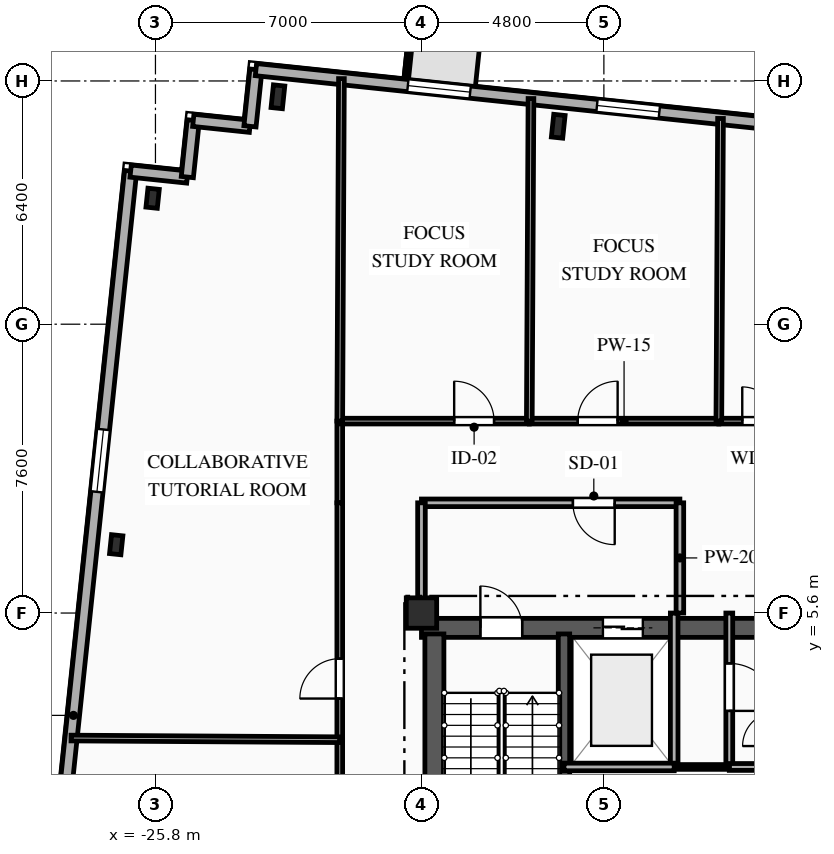
"""IFC4 building model, lengths in metres.
Left out: names, types, materials, properties, quantities, classifications, styles, units other than length and angle.
Written with IfcOpenShell. Run it as: python <this file> out.ifc"""

import sys

from ifc_helpers import new_model, si_unit, direction, frame, frame_2d, origin, origin_2d, place, context, subcontext, project, spatial, rectangle, i_section, extrude, element, fill, save


model = new_model("IFC4")
c1 = context("Model", 3, precision=1e-05, world=origin(), true_north=direction((0.0, 1.0)))
c2 = subcontext(c1, "Body", "Model", "MODEL_VIEW")
j1 = project(units=[si_unit("LENGTHUNIT", "METRE"), si_unit("PLANEANGLEUNIT", "RADIAN")], contexts=[c1])
p1 = place(None, origin())
s1 = spatial("IfcSite", under=j1, at=p1, CompositionType="ELEMENT")
p2 = place(p1, origin())
s2 = spatial("IfcBuilding", under=s1, at=p2, CompositionType="ELEMENT")
p3 = place(p2, frame((0.0, 0.0, 193.05)))
s3 = spatial("IfcBuildingStorey", under=s2, at=p3, CompositionType="ELEMENT", Elevation=193.05)
p4 = place(p3, frame((-18.8, 5.6, 0.0), z_axis=(0.0, 0.0, 1.0), x_axis=(1.0, 0.0, 0.0)))
e1 = element("IfcColumn", 1, at=p4, inside=s3, PredefinedType="COLUMN", context=c2, shape_type="SweptSolid", body=[
    extrude(rectangle(XDim=0.8, YDim=0.8, at=origin_2d()), origin(), (0.0, 0.0, 1.0), 3.35),
])
for number, where, z_axis, x_axis in (
    (2, (-15.201, 18.409, 0.0), (0.0, 0.0, 1.0), (0.995, -0.105, 0.0)),
    (3, (-22.577, 19.184, 0.0), (0.0, 0.0, 1.0), (0.995, -0.105, 0.0)),
):
    element("IfcColumn", number, at=place(p3, frame(where, z_axis=z_axis, x_axis=x_axis)), inside=s3, PredefinedType="COLUMN", context=c2, shape_type="SweptSolid", body=[
        extrude(i_section(OverallWidth=0.3, OverallDepth=0.6, WebThickness=0.015, FlangeThickness=0.03, FilletRadius=0.027, at=origin_2d()), origin(), (0.0, 0.0, 1.0), 3.35),
    ])
for number, where, z_axis, x_axis in (
    (4, (-25.875, 16.514, 0.0), (0.0, 0.0, 1.0), (0.995, -0.105, 0.0)),
    (5, (-26.833, 7.398, 0.0), (0.0, 0.0, 1.0), (0.995, -0.105, 0.0)),
):
    element("IfcColumn", number, at=place(p3, frame(where, z_axis=z_axis, x_axis=x_axis)), inside=s3, PredefinedType="COLUMN", context=c2, shape_type="SweptSolid", body=[
        extrude(i_section(OverallWidth=0.3, OverallDepth=0.5, WebThickness=0.014, FlangeThickness=0.028, FilletRadius=0.027, at=origin_2d()), origin(), (0.0, 0.0, 1.0), 3.35),
    ])
p5 = place(p3, frame((-29.463, -11.414, 0.0), z_axis=(0.0, 0.0, 1.0), x_axis=(0.104530779244, 0.994521651947, 0.0)))
e6 = element("IfcWall", 6, at=p5, inside=s3, PredefinedType="SOLIDWALL", context=c2, shape_type="SweptSolid", body=[
    extrude(rectangle(XDim=28.8, YDim=0.32, at=frame_2d((14.4, 0.0))), origin(), (0.0, 0.0, 1.0), 3.04),
])
p6 = place(p5, frame((6.355, 0.0, 0.85)))
e7 = element("IfcOpeningElement", 7, at=p6, cuts=e6, PredefinedType="OPENING", context=c2, shape_type="SweptSolid", body=[
    extrude(rectangle(XDim=1.65, YDim=1.85, at=frame_2d((0.825, 0.925))), frame((0.0, 0.17, 0.0), z_axis=(0.0, -1.0, 0.0), x_axis=(1.0, 0.0, 0.0)), (0.0, 0.0, 1.0), 0.34),
])
p7 = place(p5, frame((20.314, 0.0, 0.85)))
e8 = element("IfcOpeningElement", 8, at=p7, cuts=e6, PredefinedType="OPENING", context=c2, shape_type="SweptSolid", body=[
    extrude(rectangle(XDim=1.65, YDim=1.85, at=frame_2d((0.825, 0.925))), frame((0.0, 0.17, 0.0), z_axis=(0.0, -1.0, 0.0), x_axis=(1.0, 0.0, 0.0)), (0.0, 0.0, 1.0), 0.34),
])
p8 = place(p3, frame((-26.453, 17.229, 0.0), z_axis=(0.0, 0.0, 1.0), x_axis=(0.994508128223, -0.104659366031, 0.0)))
e9 = element("IfcWall", 9, at=p8, inside=s3, PredefinedType="SOLIDWALL", context=c2, shape_type="SweptSolid", body=[
    extrude(rectangle(XDim=1.5, YDim=0.32, at=frame_2d((0.75, 0.0))), origin(), (0.0, 0.0, 1.0), 3.04),
])
p9 = place(p3, frame((-24.961, 17.072, 0.0), z_axis=(0.0, 0.0, 1.0), x_axis=(0.104642427191, 0.994509910675, 0.0)))
e10 = element("IfcWall", 10, at=p9, inside=s3, PredefinedType="SOLIDWALL", context=c2, shape_type="SweptSolid", body=[
    extrude(rectangle(XDim=1.5, YDim=0.32, at=frame_2d((0.75, 0.0))), origin(), (0.0, 0.0, 1.0), 3.04),
])
p10 = place(p3, frame((-24.804, 18.563, 0.0), z_axis=(0.0, 0.0, 1.0), x_axis=(0.994508128223, -0.104659366031, 0.0)))
e11 = element("IfcWall", 11, at=p10, inside=s3, PredefinedType="SOLIDWALL", context=c2, shape_type="SweptSolid", body=[
    extrude(rectangle(XDim=1.5, YDim=0.32, at=frame_2d((0.75, 0.0))), origin(), (0.0, 0.0, 1.0), 3.04),
])
p11 = place(p3, frame((-23.312, 18.406, 0.0), z_axis=(0.0, 0.0, 1.0), x_axis=(0.104481464157, 0.994526834051, 0.0)))
e12 = element("IfcWall", 12, at=p11, inside=s3, PredefinedType="SOLIDWALL", context=c2, shape_type="SweptSolid", body=[
    extrude(rectangle(XDim=1.5, YDim=0.32, at=frame_2d((0.75, 0.0))), origin(), (0.0, 0.0, 1.0), 3.04),
])
p12 = place(p3, frame((-23.156, 19.898, 0.0), z_axis=(0.0, 0.0, 1.0), x_axis=(0.994522001802, -0.104527450613, 0.0)))
e13 = element("IfcWall", 13, at=p12, inside=s3, PredefinedType="SOLIDWALL", context=c2, shape_type="SweptSolid", body=[
    extrude(rectangle(XDim=45.8, YDim=0.32, at=frame_2d((22.9, 0.0))), origin(), (0.0, 0.0, 1.0), 3.04),
])
p13 = place(p12, frame((4.019, 0.0, 0.85)))
e14 = element("IfcOpeningElement", 14, at=p13, cuts=e13, PredefinedType="OPENING", context=c2, shape_type="SweptSolid", body=[
    extrude(rectangle(XDim=1.65, YDim=1.85, at=frame_2d((0.825, 0.925))), frame((0.0, 0.17, 0.0), z_axis=(0.0, -1.0, 0.0), x_axis=(1.0, 0.0, 0.0)), (0.0, 0.0, 1.0), 0.34),
])
p14 = place(p12, frame((9.024, 0.0, 0.85)))
e15 = element("IfcOpeningElement", 15, at=p14, cuts=e13, PredefinedType="OPENING", context=c2, shape_type="SweptSolid", body=[
    extrude(rectangle(XDim=1.65, YDim=1.85, at=frame_2d((0.825, 0.925))), frame((0.0, 0.17, 0.0), z_axis=(0.0, -1.0, 0.0), x_axis=(1.0, 0.0, 0.0)), (0.0, 0.0, 1.0), 0.34),
])
p15 = place(p12, frame((18.066, 0.0, 0.85)))
e16 = element("IfcOpeningElement", 16, at=p15, cuts=e13, PredefinedType="OPENING", context=c2, shape_type="SweptSolid", body=[
    extrude(rectangle(XDim=1.5, YDim=1.85, at=frame_2d((0.75, 0.925))), frame((0.0, 0.17, 0.0), z_axis=(0.0, -1.0, 0.0), x_axis=(1.0, 0.0, 0.0)), (0.0, 0.0, 1.0), 0.34),
])
p16 = place(p12, frame((27.045, 0.0, 0.85)))
e17 = element("IfcOpeningElement", 17, at=p16, cuts=e13, PredefinedType="OPENING", context=c2, shape_type="SweptSolid", body=[
    extrude(rectangle(XDim=2.2, YDim=1.85, at=frame_2d((1.1, 0.925))), frame((0.0, 0.17, 0.0), z_axis=(0.0, -1.0, 0.0), x_axis=(1.0, 0.0, 0.0)), (0.0, 0.0, 1.0), 0.34),
])
p17 = place(p12, frame((38.089, 0.0, 0.85)))
e18 = element("IfcOpeningElement", 18, at=p17, cuts=e13, PredefinedType="OPENING", context=c2, shape_type="SweptSolid", body=[
    extrude(rectangle(XDim=1.65, YDim=1.85, at=frame_2d((0.825, 0.925))), frame((0.0, 0.17, 0.0), z_axis=(0.0, -1.0, 0.0), x_axis=(1.0, 0.0, 0.0)), (0.0, 0.0, 1.0), 0.34),
])
p18 = place(p3, frame((-18.8, 5.21, 0.0), z_axis=(0.0, 0.0, 1.0), x_axis=(1.0, 0.0, 0.0)))
e19 = element("IfcWall", 19, at=p18, inside=s3, PredefinedType="SHEAR", context=c2, shape_type="SweptSolid", body=[
    extrude(rectangle(XDim=9.6, YDim=0.5, at=frame_2d((4.8, 0.0))), origin(), (0.0, 0.0, 1.0), 3.04),
])
p19 = place(p18, frame((1.55, 0.0, 0.0)))
e20 = element("IfcOpeningElement", 20, at=p19, cuts=e19, PredefinedType="OPENING", context=c2, shape_type="SweptSolid", body=[
    extrude(rectangle(XDim=1.1, YDim=2.15, at=frame_2d((0.55, 1.075))), frame((0.0, 0.26, 0.0), z_axis=(0.0, -1.0, 0.0), x_axis=(1.0, 0.0, 0.0)), (0.0, 0.0, 1.0), 0.52),
])
p20 = place(p18, frame((4.775, 0.0, 0.0)))
e21 = element("IfcOpeningElement", 21, at=p20, cuts=e19, PredefinedType="OPENING", context=c2, shape_type="SweptSolid", body=[
    extrude(rectangle(XDim=1.05, YDim=2.1, at=frame_2d((0.525, 1.05))), frame((0.0, 0.26, 0.0), z_axis=(0.0, -1.0, 0.0), x_axis=(1.0, 0.0, 0.0)), (0.0, 0.0, 1.0), 0.52),
])
p21 = place(p3, frame((-18.46, -5.05, 0.0), z_axis=(0.0, 0.0, 1.0), x_axis=(0.0, 1.0, 0.0)))
e22 = element("IfcWall", 22, at=p21, inside=s3, PredefinedType="SHEAR", context=c2, shape_type="SweptSolid", body=[
    extrude(rectangle(XDim=10.1, YDim=0.5, at=frame_2d((5.05, 0.0))), origin(), (0.0, 0.0, 1.0), 3.04),
])
p22 = place(p3, frame((-15.05, -5.05, 0.0), z_axis=(0.0, 0.0, 1.0), x_axis=(0.0, 1.0, 0.0)))
e23 = element("IfcWall", 23, at=p22, inside=s3, PredefinedType="SHEAR", context=c2, shape_type="SweptSolid", body=[
    extrude(rectangle(XDim=10.1, YDim=0.3, at=frame_2d((5.05, 0.0))), origin(), (0.0, 0.0, 1.0), 3.04),
])
p23 = place(p3, frame((-12.15, 1.55, 0.0), z_axis=(0.0, 0.0, 1.0), x_axis=(0.0, 1.0, 0.0)))
e24 = element("IfcWall", 24, at=p23, inside=s3, PredefinedType="PARTITIONING", context=c2, shape_type="SweptSolid", body=[
    extrude(rectangle(XDim=4.05, YDim=0.2, at=frame_2d((2.025, 0.0))), origin(), (0.0, 0.0, 1.0), 3.04),
])
p24 = place(p3, frame((-12.0, 8.5, 0.0), z_axis=(0.0, 0.0, 1.0), x_axis=(-1.0, 0.0, 0.0)))
e25 = element("IfcWall", 25, at=p24, inside=s3, PredefinedType="PARTITIONING", context=c2, shape_type="SweptSolid", body=[
    extrude(rectangle(XDim=6.8, YDim=0.2, at=frame_2d((3.4, 0.0))), origin(), (0.0, 0.0, 1.0), 3.04),
])
p25 = place(p24, frame((1.715, 0.0, 0.0)))
e26 = element("IfcOpeningElement", 26, at=p25, cuts=e25, PredefinedType="OPENING", context=c2, shape_type="SweptSolid", body=[
    extrude(rectangle(XDim=1.1, YDim=2.15, at=frame_2d((0.55, 1.075))), frame((0.0, 0.11, 0.0), z_axis=(0.0, -1.0, 0.0), x_axis=(1.0, 0.0, 0.0)), (0.0, 0.0, 1.0), 0.22),
])
p26 = place(p3, frame((-18.8, 8.5, 0.0), z_axis=(0.0, 0.0, 1.0), x_axis=(0.0, -1.0, 0.0)))
e27 = element("IfcWall", 27, at=p26, inside=s3, PredefinedType="PARTITIONING", context=c2, shape_type="SweptSolid", body=[
    extrude(rectangle(XDim=2.9, YDim=0.2, at=frame_2d((1.45, 0.0))), origin(), (0.0, 0.0, 1.0), 2.665),
])
p27 = place(p3, frame((-12.0, 5.6, 0.0), z_axis=(0.0, 0.0, 1.0), x_axis=(0.0, 1.0, 0.0)))
e28 = element("IfcWall", 28, at=p27, inside=s3, PredefinedType="PARTITIONING", context=c2, shape_type="SweptSolid", body=[
    extrude(rectangle(XDim=2.9, YDim=0.2, at=frame_2d((1.45, 0.0))), origin(), (0.0, 0.0, 1.0), 3.04),
])
p28 = place(p3, frame((-10.7, 5.6, 0.0), z_axis=(0.0, 0.0, 1.0), x_axis=(0.0, -1.0, 0.0)))
e29 = element("IfcWall", 29, at=p28, inside=s3, PredefinedType="PARTITIONING", context=c2, shape_type="SweptSolid", body=[
    extrude(rectangle(XDim=4.05, YDim=0.18, at=frame_2d((2.025, 0.0))), origin(), (0.0, 0.0, 1.0), 3.04),
])
p29 = place(p28, frame((1.325, 0.0, 0.0)))
e30 = element("IfcOpeningElement", 30, at=p29, cuts=e29, PredefinedType="OPENING", context=c2, shape_type="SweptSolid", body=[
    extrude(rectangle(XDim=1.25, YDim=2.2, at=frame_2d((0.625, 1.1))), frame((0.0, 0.1, 0.0), z_axis=(0.0, -1.0, 0.0), x_axis=(1.0, 0.0, 0.0)), (0.0, 0.0, 1.0), 0.2),
])
p30 = place(p3, frame((-10.7, 1.55, 0.0), z_axis=(0.0, 0.0, 1.0), x_axis=(1.0, 0.0, 0.0)))
e31 = element("IfcWall", 31, at=p30, inside=s3, PredefinedType="PARTITIONING", context=c2, shape_type="SweptSolid", body=[
    extrude(rectangle(XDim=1.5, YDim=0.18, at=frame_2d((0.75, 0.0))), origin(), (0.0, 0.0, 1.0), 3.04),
])
p31 = place(p3, frame((-12.15, 1.55, 0.0), z_axis=(0.0, 0.0, 1.0), x_axis=(1.0, 0.0, 0.0)))
e32 = element("IfcWall", 32, at=p31, inside=s3, PredefinedType="PARTITIONING", context=c2, shape_type="SweptSolid", body=[
    extrude(rectangle(XDim=1.45, YDim=0.125, at=frame_2d((0.725, 0.0))), origin(), (0.0, 0.0, 1.0), 3.04),
])
p32 = place(p3, frame((-20.95, 8.5, 0.0), z_axis=(0.0, 0.0, 1.0), x_axis=(0.0, 1.0, 0.0)))
e33 = element("IfcWall", 33, at=p32, inside=s3, PredefinedType="PARTITIONING", context=c2, shape_type="SweptSolid", body=[
    extrude(rectangle(XDim=2.15, YDim=0.15, at=frame_2d((1.075, 0.0))), origin(), (0.0, 0.0, 1.0), 3.04),
])
p33 = place(p3, frame((-20.95, 10.65, 0.0), z_axis=(0.0, 0.0, 1.0), x_axis=(1.0, 0.0, 0.0)))
e34 = element("IfcWall", 34, at=p33, inside=s3, PredefinedType="PARTITIONING", context=c2, shape_type="SweptSolid", body=[
    extrude(rectangle(XDim=4.988, YDim=0.15, at=frame_2d((2.494, 0.0))), origin(), (0.0, 0.0, 1.0), 3.04),
])
p34 = place(p33, frame((3.01, 0.0, 0.0)))
e35 = element("IfcOpeningElement", 35, at=p34, cuts=e34, PredefinedType="OPENING", context=c2, shape_type="SweptSolid", body=[
    extrude(rectangle(XDim=1.05, YDim=2.15, at=frame_2d((0.525, 1.075))), frame((0.0, 0.085, 0.0), z_axis=(0.0, -1.0, 0.0), x_axis=(1.0, 0.0, 0.0)), (0.0, 0.0, 1.0), 0.17),
])
p35 = place(p3, frame((-15.962, 10.65, 0.0), z_axis=(0.0, 0.0, 1.0), x_axis=(1.0, 0.0, 0.0)))
e36 = element("IfcWall", 36, at=p35, inside=s3, PredefinedType="PARTITIONING", context=c2, shape_type="SweptSolid", body=[
    extrude(rectangle(XDim=4.987, YDim=0.15, at=frame_2d((2.494, 0.0))), origin(), (0.0, 0.0, 1.0), 3.04),
])
p36 = place(p35, frame((1.274, 0.0, 0.0)))
e37 = element("IfcOpeningElement", 37, at=p36, cuts=e36, PredefinedType="OPENING", context=c2, shape_type="SweptSolid", body=[
    extrude(rectangle(XDim=1.05, YDim=2.15, at=frame_2d((0.525, 1.075))), frame((0.0, 0.085, 0.0), z_axis=(0.0, -1.0, 0.0), x_axis=(1.0, 0.0, 0.0)), (0.0, 0.0, 1.0), 0.17),
])
p37 = place(p3, frame((-10.975, 10.65, 0.0), z_axis=(0.0, 0.0, 1.0), x_axis=(1.0, 0.0, 0.0)))
e38 = element("IfcWall", 38, at=p37, inside=s3, PredefinedType="PLUMBINGWALL", context=c2, shape_type="SweptSolid", body=[
    extrude(rectangle(XDim=2.35, YDim=0.15, at=frame_2d((1.175, 0.0))), origin(), (0.0, 0.0, 1.0), 3.04),
])
p38 = place(p37, frame((0.616, 0.0, 0.0)))
e39 = element("IfcOpeningElement", 39, at=p38, cuts=e38, PredefinedType="OPENING", context=c2, shape_type="SweptSolid", body=[
    extrude(rectangle(XDim=0.9, YDim=2.1, at=frame_2d((0.45, 1.05))), frame((0.0, 0.085, 0.0), z_axis=(0.0, -1.0, 0.0), x_axis=(1.0, 0.0, 0.0)), (0.0, 0.0, 1.0), 0.17),
])
p39 = place(p3, frame((-20.95, -5.6, 0.0), z_axis=(0.0, 0.0, 1.0), x_axis=(0.0, 1.0, 0.0)))
e40 = element("IfcWall", 40, at=p39, inside=s3, PredefinedType="PARTITIONING", context=c2, shape_type="SweptSolid", body=[
    extrude(rectangle(XDim=7.867, YDim=0.15, at=frame_2d((3.934, 0.0))), origin(), (0.0, 0.0, 1.0), 3.04),
])
p40 = place(p39, frame((4.823, 0.0, 0.0)))
e41 = element("IfcOpeningElement", 41, at=p40, cuts=e40, PredefinedType="OPENING", context=c2, shape_type="SweptSolid", body=[
    extrude(rectangle(XDim=1.05, YDim=2.15, at=frame_2d((0.525, 1.075))), frame((0.0, 0.085, 0.0), z_axis=(0.0, -1.0, 0.0), x_axis=(1.0, 0.0, 0.0)), (0.0, 0.0, 1.0), 0.17),
])
p41 = place(p3, frame((-20.95, 2.267, 0.0), z_axis=(0.0, 0.0, 1.0), x_axis=(0.0, 1.0, 0.0)))
e42 = element("IfcWall", 42, at=p41, inside=s3, PredefinedType="PARTITIONING", context=c2, shape_type="SweptSolid", body=[
    extrude(rectangle(XDim=6.233, YDim=0.15, at=frame_2d((3.116, 0.0))), origin(), (0.0, 0.0, 1.0), 3.04),
])
p42 = place(p41, frame((1.083, 0.0, 0.0)))
e43 = element("IfcOpeningElement", 43, at=p42, cuts=e42, PredefinedType="OPENING", context=c2, shape_type="SweptSolid", body=[
    extrude(rectangle(XDim=1.05, YDim=2.15, at=frame_2d((0.525, 1.075))), frame((0.0, 0.085, 0.0), z_axis=(0.0, -1.0, 0.0), x_axis=(1.0, 0.0, 0.0)), (0.0, 0.0, 1.0), 0.17),
])
p43 = place(p3, frame((-28.021, 2.311, 0.0), z_axis=(0.0, 0.0, 1.0), x_axis=(0.99998090118, -0.006180394355, 0.0)))
e44 = element("IfcWall", 44, at=p43, inside=s3, PredefinedType="PARTITIONING", context=c2, shape_type="SweptSolid", body=[
    extrude(rectangle(XDim=7.071, YDim=0.15, at=frame_2d((3.536, 0.0))), origin(), (0.0, 0.0, 1.0), 3.04),
])
p44 = place(p3, frame((-20.906, 19.662, 0.0), z_axis=(0.0, 0.0, 1.0), x_axis=(-0.004876272857, -0.999988110911, 0.0)))
e45 = element("IfcWall", 45, at=p44, inside=s3, PredefinedType="PARTITIONING", context=c2, shape_type="SweptSolid", body=[
    extrude(rectangle(XDim=9.012, YDim=0.15, at=frame_2d((4.506, 0.0))), origin(), (0.0, 0.0, 1.0), 2.665),
])
p45 = place(p3, frame((-15.919, 19.138, 0.0), z_axis=(0.0, 0.0, 1.0), x_axis=(-0.005148640266, -0.999986745664, 0.0)))
e46 = element("IfcWall", 46, at=p45, inside=s3, PredefinedType="PARTITIONING", context=c2, shape_type="SweptSolid", body=[
    extrude(rectangle(XDim=8.488, YDim=0.15, at=frame_2d((4.244, 0.0))), origin(), (0.0, 0.0, 1.0), 2.665),
])
p46 = place(p3, frame((-10.931, 18.614, 0.0), z_axis=(0.0, 0.0, 1.0), x_axis=(-0.005518172214, -0.999984774772, 0.0)))
e47 = element("IfcWall", 47, at=p46, inside=s3, PredefinedType="PLUMBINGWALL", context=c2, shape_type="SweptSolid", body=[
    extrude(rectangle(XDim=7.964, YDim=0.15, at=frame_2d((3.982, 0.0))), origin(), (0.0, 0.0, 1.0), 3.04),
])
p47 = place(p3, frame((-15.05, 1.55, 0.0), z_axis=(0.0, 0.0, 1.0), x_axis=(1.0, 0.0, 0.0)))
e48 = element("IfcWall", 48, at=p47, inside=s3, PredefinedType="PARTITIONING", context=c2, shape_type="SweptSolid", body=[
    extrude(rectangle(XDim=2.9, YDim=0.2, at=frame_2d((1.45, 0.0))), origin(), (0.0, 0.0, 1.0), 3.04),
])
p48 = place(p7, origin())
e49 = element("IfcWindow", 49, at=p48, inside=s3, PartitioningType="SINGLE_PANEL", PredefinedType="WINDOW", context=c2, shape_type="SweptSolid", body=[
    extrude(rectangle(XDim=1.65, YDim=1.85, at=frame_2d((0.825, 0.925))), frame((0.0, 0.03, 0.0), z_axis=(0.0, -1.0, 0.0), x_axis=(1.0, 0.0, 0.0)), (0.0, 0.0, 1.0), 0.06),
])
fill(e8, e49)
p49 = place(p13, origin())
e50 = element("IfcWindow", 50, at=p49, inside=s3, PartitioningType="SINGLE_PANEL", PredefinedType="WINDOW", context=c2, shape_type="SweptSolid", body=[
    extrude(rectangle(XDim=1.65, YDim=1.85, at=frame_2d((0.825, 0.925))), frame((0.0, 0.03, 0.0), z_axis=(0.0, -1.0, 0.0), x_axis=(1.0, 0.0, 0.0)), (0.0, 0.0, 1.0), 0.06),
])
fill(e14, e50)
p50 = place(p14, origin())
e51 = element("IfcWindow", 51, at=p50, inside=s3, PartitioningType="SINGLE_PANEL", PredefinedType="WINDOW", context=c2, shape_type="SweptSolid", body=[
    extrude(rectangle(XDim=1.65, YDim=1.85, at=frame_2d((0.825, 0.925))), frame((0.0, 0.03, 0.0), z_axis=(0.0, -1.0, 0.0), x_axis=(1.0, 0.0, 0.0)), (0.0, 0.0, 1.0), 0.06),
])
fill(e15, e51)
p51 = place(p19, origin())
e52 = element("IfcDoor", 52, at=p51, inside=s3, OperationType="SINGLE_SWING_LEFT", PredefinedType="DOOR", context=c2, shape_type="SweptSolid", body=[
    extrude(rectangle(XDim=1.1, YDim=2.15, at=frame_2d((0.55, 1.075))), frame((0.0, 0.025, 0.0), z_axis=(0.0, -1.0, 0.0), x_axis=(1.0, 0.0, 0.0)), (0.0, 0.0, 1.0), 0.05),
])
fill(e20, e52)
p52 = place(p20, origin())
e53 = element("IfcDoor", 53, at=p52, inside=s3, OperationType="DOUBLE_DOOR_SLIDING", PredefinedType="DOOR", context=c2, shape_type="SweptSolid", body=[
    extrude(rectangle(XDim=1.05, YDim=2.1, at=frame_2d((0.525, 1.05))), frame((0.0, 0.025, 0.0), z_axis=(0.0, -1.0, 0.0), x_axis=(1.0, 0.0, 0.0)), (0.0, 0.0, 1.0), 0.05),
])
fill(e21, e53)
p53 = place(p25, origin())
e54 = element("IfcDoor", 54, at=p53, inside=s3, OperationType="SINGLE_SWING_LEFT", PredefinedType="DOOR", context=c2, shape_type="SweptSolid", body=[
    extrude(rectangle(XDim=1.1, YDim=2.15, at=frame_2d((0.55, 1.075))), frame((0.0, 0.025, 0.0), z_axis=(0.0, -1.0, 0.0), x_axis=(1.0, 0.0, 0.0)), (0.0, 0.0, 1.0), 0.05),
])
fill(e26, e54)
p54 = place(p29, origin())
e55 = element("IfcDoor", 55, at=p54, inside=s3, OperationType="SINGLE_SWING_RIGHT", PredefinedType="DOOR", context=c2, shape_type="SweptSolid", body=[
    extrude(rectangle(XDim=1.25, YDim=2.2, at=frame_2d((0.625, 1.1))), frame((0.0, 0.025, 0.0), z_axis=(0.0, -1.0, 0.0), x_axis=(1.0, 0.0, 0.0)), (0.0, 0.0, 1.0), 0.05),
])
fill(e30, e55)
p55 = place(p34, origin())
e56 = element("IfcDoor", 56, at=p55, inside=s3, OperationType="SINGLE_SWING_LEFT", PredefinedType="DOOR", context=c2, shape_type="SweptSolid", body=[
    extrude(rectangle(XDim=1.05, YDim=2.15, at=frame_2d((0.525, 1.075))), frame((0.0, 0.025, 0.0), z_axis=(0.0, -1.0, 0.0), x_axis=(1.0, 0.0, 0.0)), (0.0, 0.0, 1.0), 0.05),
])
fill(e35, e56)
p56 = place(p36, origin())
e57 = element("IfcDoor", 57, at=p56, inside=s3, OperationType="SINGLE_SWING_RIGHT", PredefinedType="DOOR", context=c2, shape_type="SweptSolid", body=[
    extrude(rectangle(XDim=1.05, YDim=2.15, at=frame_2d((0.525, 1.075))), frame((0.0, 0.025, 0.0), z_axis=(0.0, -1.0, 0.0), x_axis=(1.0, 0.0, 0.0)), (0.0, 0.0, 1.0), 0.05),
])
fill(e37, e57)
p57 = place(p38, origin())
e58 = element("IfcDoor", 58, at=p57, inside=s3, OperationType="SINGLE_SWING_LEFT", PredefinedType="DOOR", context=c2, shape_type="SweptSolid", body=[
    extrude(rectangle(XDim=0.9, YDim=2.1, at=frame_2d((0.45, 1.05))), frame((0.0, 0.025, 0.0), z_axis=(0.0, -1.0, 0.0), x_axis=(1.0, 0.0, 0.0)), (0.0, 0.0, 1.0), 0.05),
])
fill(e39, e58)
p58 = place(p42, origin())
e59 = element("IfcDoor", 59, at=p58, inside=s3, OperationType="SINGLE_SWING_LEFT", PredefinedType="DOOR", context=c2, shape_type="SweptSolid", body=[
    extrude(rectangle(XDim=1.05, YDim=2.15, at=frame_2d((0.525, 1.075))), frame((0.0, 0.025, 0.0), z_axis=(0.0, -1.0, 0.0), x_axis=(1.0, 0.0, 0.0)), (0.0, 0.0, 1.0), 0.05),
])
fill(e43, e59)
save(model, sys.argv[1])
